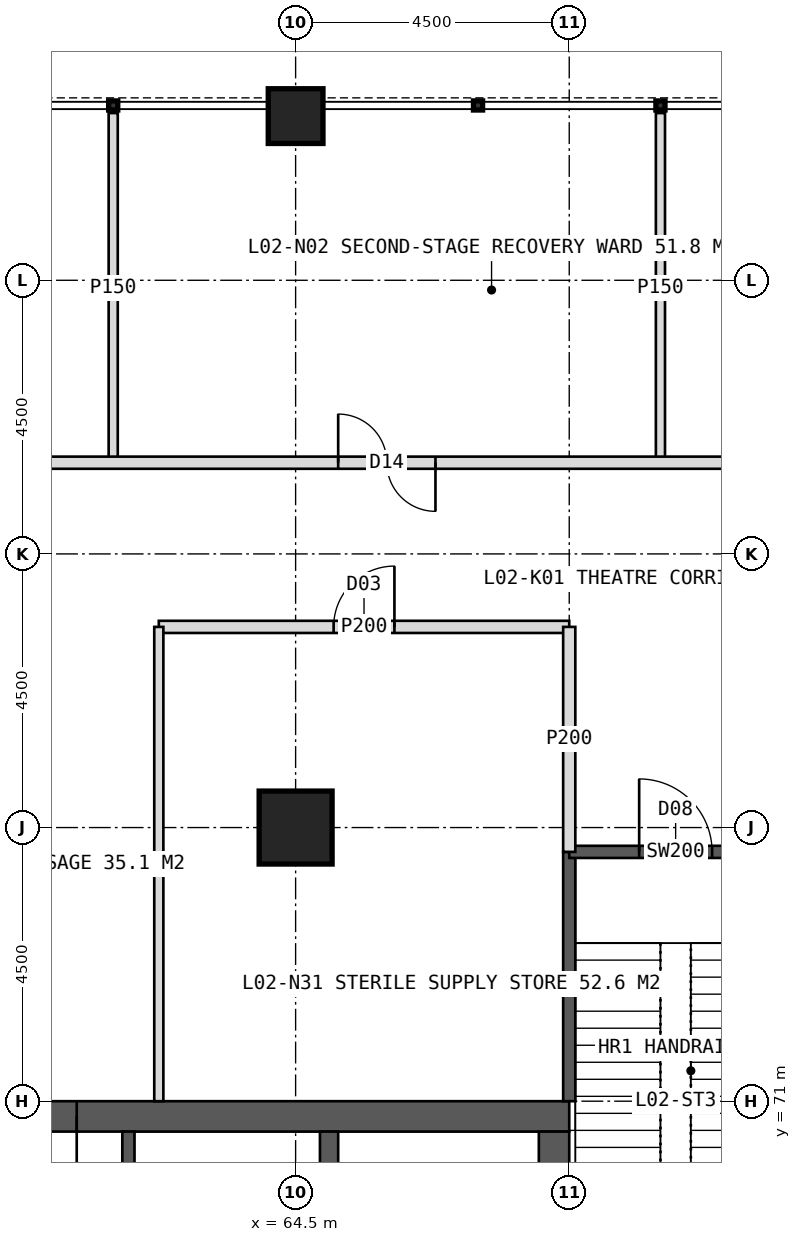
"""IFC4 building model, lengths in metres.
Left out: names, types, materials, properties, quantities, classifications, styles, units other than length and angle.
Written with IfcOpenShell. Run it as: python <this file> out.ifc"""

import sys

from ifc_helpers import new_model, si_unit, direction, frame, frame_2d, origin, origin_2d, place, context, subcontext, project, spatial, rectangle, hollow_rectangle, extrude, element, fill, save


model = new_model("IFC4")
c1 = context("Model", 3, precision=1e-05, world=origin(), true_north=direction((0.0, 1.0)))
c2 = subcontext(c1, "Body", "Model", "MODEL_VIEW")
j1 = project(units=[si_unit("LENGTHUNIT", "METRE"), si_unit("PLANEANGLEUNIT", "RADIAN")], contexts=[c1])
p1 = place(None, origin())
s1 = spatial("IfcSite", under=j1, at=p1, CompositionType="ELEMENT")
p2 = place(p1, origin())
s2 = spatial("IfcBuilding", under=s1, at=p2, CompositionType="ELEMENT")
p3 = place(p2, frame((0.0, 0.0, 11.0)))
s3 = spatial("IfcBuildingStorey", under=s2, at=p3, CompositionType="ELEMENT", Elevation=11.0)
p4 = place(p3, frame((51.0, 70.75, 0.0), z_axis=(0.0, 0.0, 1.0), x_axis=(1.0, 0.0, 0.0)))
e1 = element("IfcWall", 1, at=p4, inside=s3, PredefinedType="SHEAR", context=c2, shape_type="SweptSolid", body=[
    extrude(rectangle(XDim=18.0, YDim=0.5, at=frame_2d((9.0, 0.0))), origin(), (0.0, 0.0, 1.0), 5.5),
])
p5 = place(p4, frame((8.1, 0.0, 0.0)))
e2 = element("IfcOpeningElement", 2, at=p5, cuts=e1, PredefinedType="OPENING", context=c2, shape_type="SweptSolid", body=[
    extrude(rectangle(XDim=1.8, YDim=2.2, at=frame_2d((0.9, 1.1))), frame((0.0, 0.26, 0.0), z_axis=(0.0, -1.0, 0.0), x_axis=(1.0, 0.0, 0.0)), (0.0, 0.0, 1.0), 0.52),
])
p6 = place(p3, frame((68.75, 53.5, 0.0), z_axis=(0.0, 0.0, 1.0), x_axis=(0.0, 1.0, 0.0)))
e3 = element("IfcWall", 3, at=p6, inside=s3, PredefinedType="SHEAR", context=c2, shape_type="SweptSolid", body=[
    extrude(rectangle(XDim=17.0, YDim=0.5, at=frame_2d((8.5, 0.0))), origin(), (0.0, 0.0, 1.0), 5.5),
])
p7 = place(p6, frame((9.5, 0.0, 0.0)))
e4 = element("IfcOpeningElement", 4, at=p7, cuts=e3, PredefinedType="OPENING", context=c2, shape_type="SweptSolid", body=[
    extrude(rectangle(XDim=1.5, YDim=2.2, at=frame_2d((0.75, 1.1))), frame((0.0, 0.26, 0.0), z_axis=(0.0, -1.0, 0.0), x_axis=(1.0, 0.0, 0.0)), (0.0, 0.0, 1.0), 0.52),
])
p8 = place(p3, frame((65.05, 53.5, 0.0), z_axis=(0.0, 0.0, 1.0), x_axis=(0.0, 1.0, 0.0)))
e5 = element("IfcWall", 5, at=p8, inside=s3, PredefinedType="SHEAR", context=c2, shape_type="SweptSolid", body=[
    extrude(rectangle(XDim=17.0, YDim=0.3, at=frame_2d((8.5, 0.0))), origin(), (0.0, 0.0, 1.0), 5.5),
])
p9 = place(p3, frame((61.75, 53.5, 0.0), z_axis=(0.0, 0.0, 1.0), x_axis=(0.0, 1.0, 0.0)))
e6 = element("IfcWall", 6, at=p9, inside=s3, PredefinedType="SHEAR", context=c2, shape_type="SweptSolid", body=[
    extrude(rectangle(XDim=17.0, YDim=0.2, at=frame_2d((8.5, 0.0))), origin(), (0.0, 0.0, 1.0), 5.5),
])
p10 = place(p9, frame((1.375, 0.0, 0.0)))
e7 = element("IfcOpeningElement", 7, at=p10, cuts=e6, PredefinedType="OPENING", context=c2, shape_type="SweptSolid", body=[
    extrude(rectangle(XDim=1.4, YDim=2.2, at=frame_2d((0.7, 1.1))), frame((0.0, 0.11, 0.0), z_axis=(0.0, -1.0, 0.0), x_axis=(1.0, 0.0, 0.0)), (0.0, 0.0, 1.0), 0.22),
])
p11 = place(p9, frame((5.675, 0.0, 0.0)))
e8 = element("IfcOpeningElement", 8, at=p11, cuts=e6, PredefinedType="OPENING", context=c2, shape_type="SweptSolid", body=[
    extrude(rectangle(XDim=1.4, YDim=2.2, at=frame_2d((0.7, 1.1))), frame((0.0, 0.11, 0.0), z_axis=(0.0, -1.0, 0.0), x_axis=(1.0, 0.0, 0.0)), (0.0, 0.0, 1.0), 0.22),
])
p12 = place(p3, frame((64.5, 75.5, 0.0), z_axis=(0.0, 0.0, 1.0), x_axis=(1.0, 0.0, 0.0)))
e9 = element("IfcColumn", 9, at=p12, inside=s3, PredefinedType="COLUMN", context=c2, shape_type="SweptSolid", body=[
    extrude(hollow_rectangle(XDim=1.2, YDim=1.2, WallThickness=0.1, at=origin_2d()), origin(), (0.0, 0.0, 1.0), 5.5),
])
p13 = place(p3, frame((64.5, 87.2, 0.0), z_axis=(0.0, 0.0, 1.0), x_axis=(1.0, 0.0, 0.0)))
e10 = element("IfcColumn", 10, at=p13, inside=s3, PredefinedType="COLUMN", context=c2, shape_type="SweptSolid", body=[
    extrude(hollow_rectangle(XDim=0.9, YDim=0.9, WallThickness=0.08, at=origin_2d()), origin(), (0.0, 0.0, 1.0), 5.5),
])
for number, where, z_axis, x_axis in (
    (11, (61.5, 81.5, 0.0), (0.0, 0.0, 1.0), (0.0, 1.0, 0.0)),
    (12, (70.5, 81.5, 0.0), (0.0, 0.0, 1.0), (0.0, 1.0, 0.0)),
):
    element("IfcWall", number, at=place(p3, frame(where, z_axis=z_axis, x_axis=x_axis)), inside=s3, PredefinedType="PARTITIONING", context=c2, shape_type="SweptSolid", body=[
        extrude(rectangle(XDim=5.75, YDim=0.15, at=frame_2d((2.875, 0.0))), origin(), (0.0, 0.0, 1.0), 5.2),
    ])
p14 = place(p3, frame((40.5, 81.5, 0.0), z_axis=(0.0, 0.0, 1.0), x_axis=(1.0, 0.0, 0.0)))
e13 = element("IfcWall", 13, at=p14, inside=s3, PredefinedType="PARTITIONING", context=c2, shape_type="SweptSolid", body=[
    extrude(rectangle(XDim=39.0, YDim=0.2, at=frame_2d((19.5, 0.0))), origin(), (0.0, 0.0, 1.0), 5.2),
])
p15 = place(p14, frame((9.7, 0.0, 0.0)))
e14 = element("IfcOpeningElement", 14, at=p15, cuts=e13, PredefinedType="OPENING", context=c2, shape_type="SweptSolid", body=[
    extrude(rectangle(XDim=1.6, YDim=2.2, at=frame_2d((0.8, 1.1))), frame((0.0, 0.11, 0.0), z_axis=(0.0, -1.0, 0.0), x_axis=(1.0, 0.0, 0.0)), (0.0, 0.0, 1.0), 0.22),
])
p16 = place(p14, frame((24.7, 0.0, 0.0)))
e15 = element("IfcOpeningElement", 15, at=p16, cuts=e13, PredefinedType="OPENING", context=c2, shape_type="SweptSolid", body=[
    extrude(rectangle(XDim=1.6, YDim=2.2, at=frame_2d((0.8, 1.1))), frame((0.0, 0.11, 0.0), z_axis=(0.0, -1.0, 0.0), x_axis=(1.0, 0.0, 0.0)), (0.0, 0.0, 1.0), 0.22),
])
p17 = place(p14, frame((33.7, 0.0, 0.0)))
e16 = element("IfcOpeningElement", 16, at=p17, cuts=e13, PredefinedType="OPENING", context=c2, shape_type="SweptSolid", body=[
    extrude(rectangle(XDim=1.6, YDim=2.2, at=frame_2d((0.8, 1.1))), frame((0.0, 0.11, 0.0), z_axis=(0.0, -1.0, 0.0), x_axis=(1.0, 0.0, 0.0)), (0.0, 0.0, 1.0), 0.22),
])
p18 = place(p3, frame((62.25, 78.8, 0.0), z_axis=(0.0, 0.0, 1.0), x_axis=(1.0, 0.0, 0.0)))
e17 = element("IfcWall", 17, at=p18, inside=s3, PredefinedType="PARTITIONING", context=c2, shape_type="SweptSolid", body=[
    extrude(rectangle(XDim=6.75, YDim=0.2, at=frame_2d((3.375, 0.0))), origin(), (0.0, 0.0, 1.0), 5.2),
])
p19 = place(p18, frame((2.875, 0.0, 0.0)))
e18 = element("IfcOpeningElement", 18, at=p19, cuts=e17, PredefinedType="OPENING", context=c2, shape_type="SweptSolid", body=[
    extrude(rectangle(XDim=1.0, YDim=2.1, at=frame_2d((0.5, 1.05))), frame((0.0, 0.11, 0.0), z_axis=(0.0, -1.0, 0.0), x_axis=(1.0, 0.0, 0.0)), (0.0, 0.0, 1.0), 0.22),
])
p20 = place(p3, frame((62.25, 71.0, 0.0), z_axis=(0.0, 0.0, 1.0), x_axis=(0.0, 1.0, 0.0)))
e19 = element("IfcWall", 19, at=p20, inside=s3, PredefinedType="PARTITIONING", context=c2, shape_type="SweptSolid", body=[
    extrude(rectangle(XDim=7.8, YDim=0.15, at=frame_2d((3.9, 0.0))), origin(), (0.0, 0.0, 1.0), 5.2),
])
p21 = place(p3, frame((69.0, 71.0, 0.0), z_axis=(0.0, 0.0, 1.0), x_axis=(0.0, 1.0, 0.0)))
e20 = element("IfcWall", 20, at=p21, inside=s3, PredefinedType="SOLIDWALL", context=c2, shape_type="SweptSolid", body=[
    extrude(rectangle(XDim=4.1, YDim=0.2, at=frame_2d((2.05, 0.0))), origin(), (0.0, 0.0, 1.0), 5.2),
])
p22 = place(p3, frame((69.0, 75.1, 0.0), z_axis=(0.0, 0.0, 1.0), x_axis=(1.0, 0.0, 0.0)))
e21 = element("IfcWall", 21, at=p22, inside=s3, PredefinedType="SOLIDWALL", context=c2, shape_type="SweptSolid", body=[
    extrude(rectangle(XDim=3.5, YDim=0.2, at=frame_2d((1.75, 0.0))), origin(), (0.0, 0.0, 1.0), 5.2),
])
p23 = place(p22, frame((1.15, 0.0, 0.0)))
e22 = element("IfcOpeningElement", 22, at=p23, cuts=e21, PredefinedType="OPENING", context=c2, shape_type="SweptSolid", body=[
    extrude(rectangle(XDim=1.2, YDim=2.1, at=frame_2d((0.6, 1.05))), frame((0.0, 0.11, 0.0), z_axis=(0.0, -1.0, 0.0), x_axis=(1.0, 0.0, 0.0)), (0.0, 0.0, 1.0), 0.22),
])
p24 = place(p3, frame((69.0, 75.1, 0.0), z_axis=(0.0, 0.0, 1.0), x_axis=(0.0, 1.0, 0.0)))
e23 = element("IfcWall", 23, at=p24, inside=s3, PredefinedType="PARTITIONING", context=c2, shape_type="SweptSolid", body=[
    extrude(rectangle(XDim=3.7, YDim=0.2, at=frame_2d((1.85, 0.0))), origin(), (0.0, 0.0, 1.0), 5.2),
])
p25 = place(p19, origin())
e24 = element("IfcDoor", 24, at=p25, inside=s3, OperationType="SINGLE_SWING_RIGHT", PredefinedType="DOOR", context=c2, shape_type="SweptSolid", body=[
    extrude(rectangle(XDim=1.0, YDim=2.1, at=frame_2d((0.5, 1.05))), frame((0.0, 0.025, 0.0), z_axis=(0.0, -1.0, 0.0), x_axis=(1.0, 0.0, 0.0)), (0.0, 0.0, 1.0), 0.05),
])
fill(e18, e24)
p26 = place(p5, origin())
e25 = element("IfcDoor", 25, at=p26, inside=s3, OperationType="DOUBLE_DOOR_SINGLE_SWING", PredefinedType="DOOR", context=c2, shape_type="SweptSolid", body=[
    extrude(rectangle(XDim=1.8, YDim=2.2, at=frame_2d((0.9, 1.1))), frame((0.0, 0.025, 0.0), z_axis=(0.0, -1.0, 0.0), x_axis=(1.0, 0.0, 0.0)), (0.0, 0.0, 1.0), 0.05),
])
fill(e2, e25)
p27 = place(p16, origin())
e26 = element("IfcDoor", 26, at=p27, inside=s3, OperationType="DOUBLE_DOOR_DOUBLE_SWING", PredefinedType="DOOR", context=c2, shape_type="SweptSolid", body=[
    extrude(rectangle(XDim=1.6, YDim=2.2, at=frame_2d((0.8, 1.1))), frame((0.0, 0.025, 0.0), z_axis=(0.0, -1.0, 0.0), x_axis=(1.0, 0.0, 0.0)), (0.0, 0.0, 1.0), 0.05),
])
fill(e15, e26)
p28 = place(p23, origin())
e27 = element("IfcDoor", 27, at=p28, inside=s3, OperationType="SINGLE_SWING_LEFT", PredefinedType="DOOR", context=c2, shape_type="SweptSolid", body=[
    extrude(rectangle(XDim=1.2, YDim=2.1, at=frame_2d((0.6, 1.05))), frame((0.0, 0.025, 0.0), z_axis=(0.0, -1.0, 0.0), x_axis=(1.0, 0.0, 0.0)), (0.0, 0.0, 1.0), 0.05),
])
fill(e22, e27)
save(model, sys.argv[1])
